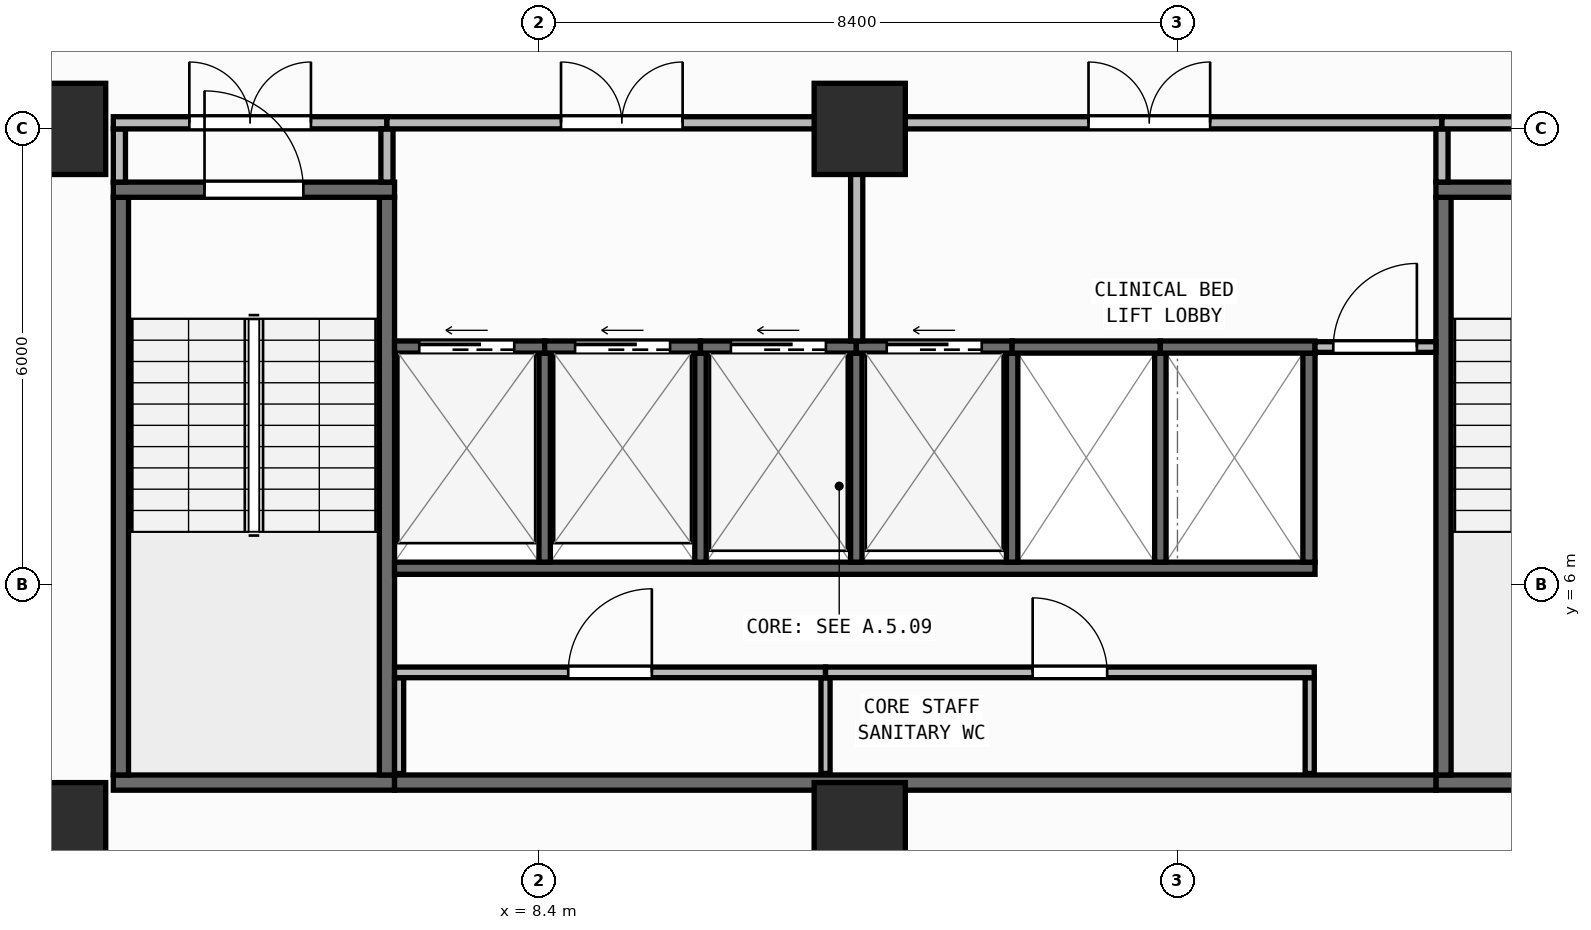
"""IFC4 building model, lengths in metres.
Left out: names, types, materials, properties, quantities, classifications, styles, units other than length and angle.
Written with IfcOpenShell. Run it as: python <this file> out.ifc"""

import sys

from ifc_helpers import new_model, si_unit, direction, frame, frame_2d, origin, origin_2d, place, context, subcontext, project, spatial, rectangle, extrude, element, fill, save


model = new_model("IFC4")
c1 = context("Model", 3, precision=1e-05, world=origin(), true_north=direction((0.0, 1.0)))
c2 = subcontext(c1, "Body", "Model", "MODEL_VIEW")
j1 = project(units=[si_unit("LENGTHUNIT", "METRE"), si_unit("PLANEANGLEUNIT", "RADIAN")], contexts=[c1])
p1 = place(None, origin())
s1 = spatial("IfcSite", under=j1, at=p1, CompositionType="ELEMENT")
p2 = place(p1, origin())
s2 = spatial("IfcBuilding", under=s1, at=p2, CompositionType="ELEMENT")
p3 = place(p2, frame((0.0, 0.0, 123.1)))
s3 = spatial("IfcBuildingStorey", under=s2, at=p3, CompositionType="ELEMENT", Elevation=123.1)
for number, where, z_axis, x_axis in (
    (1, (2.1, 2.8, 0.0), (0.0, 0.0, 1.0), (1.0, 0.0, 0.0)),
    (2, (12.62, 2.8, 0.0), (0.0, 0.0, 1.0), (1.0, 0.0, 0.0)),
    (3, (2.1, 12.0, 0.0), (0.0, 0.0, 1.0), (1.0, 0.0, 0.0)),
    (4, (12.62, 12.0, 0.0), (0.0, 0.0, 1.0), (1.0, 0.0, 0.0)),
):
    element("IfcColumn", number, at=place(p3, frame(where, z_axis=z_axis, x_axis=x_axis)), inside=s3, PredefinedType="COLUMN", context=c2, shape_type="SweptSolid", body=[
        extrude(rectangle(XDim=1.2, YDim=1.2, at=origin_2d()), origin(), (0.0, 0.0, 1.0), 3.95),
    ])
p4 = place(p3, frame((2.76, 0.173, 0.0), z_axis=(0.0, 0.0, 1.0), x_axis=(0.996857931723, 0.079210251617, 0.0)))
e5 = element("IfcWall", 5, at=p4, inside=s3, PredefinedType="STANDARD", context=c2, shape_type="SweptSolid", body=[
    extrude(rectangle(XDim=51.442, YDim=0.26, at=frame_2d((25.721, 0.0))), origin(), (0.0, 0.0, 1.0), 3.71),
])
p5 = place(p4, frame((24.521, 0.0, 0.9)))
e6 = element("IfcOpeningElement", 6, at=p5, cuts=e5, PredefinedType="OPENING", context=c2, shape_type="SweptSolid", body=[
    extrude(rectangle(XDim=2.4, YDim=1.65, at=frame_2d((1.2, 0.825))), frame((0.0, 0.14, 0.0), z_axis=(0.0, -1.0, 0.0), x_axis=(1.0, 0.0, 0.0)), (0.0, 0.0, 1.0), 0.28),
])
p6 = place(p3, frame((2.8, 3.4, 0.0), z_axis=(0.0, 0.0, 1.0), x_axis=(1.0, 0.0, 0.0)))
e7 = element("IfcWall", 7, at=p6, inside=s3, PredefinedType="SHEAR", context=c2, shape_type="SweptSolid", body=[
    extrude(rectangle(XDim=3.7, YDim=0.2, at=frame_2d((1.85, 0.0))), origin(), (0.0, 0.0, 1.0), 3.71),
])
for number, where, z_axis, x_axis in (
    (8, (2.9, 3.5, 0.0), (0.0, 0.0, 1.0), (0.0, 1.0, 0.0)),
    (9, (6.4, 3.5, 0.0), (0.0, 0.0, 1.0), (0.0, 1.0, 0.0)),
):
    element("IfcWall", number, at=place(p3, frame(where, z_axis=z_axis, x_axis=x_axis)), inside=s3, PredefinedType="SHEAR", context=c2, shape_type="SweptSolid", body=[
        extrude(rectangle(XDim=7.6, YDim=0.2, at=frame_2d((3.8, 0.0))), origin(), (0.0, 0.0, 1.0), 3.71),
    ])
p7 = place(p3, frame((2.8, 11.2, 0.0), z_axis=(0.0, 0.0, 1.0), x_axis=(1.0, 0.0, 0.0)))
e10 = element("IfcWall", 10, at=p7, inside=s3, PredefinedType="SHEAR", context=c2, shape_type="SweptSolid", body=[
    extrude(rectangle(XDim=3.7, YDim=0.2, at=frame_2d((1.85, 0.0))), origin(), (0.0, 0.0, 1.0), 3.71),
])
p8 = place(p7, frame((1.2, 0.0, 0.0)))
e11 = element("IfcOpeningElement", 11, at=p8, cuts=e10, PredefinedType="OPENING", context=c2, shape_type="SweptSolid", body=[
    extrude(rectangle(XDim=1.3, YDim=2.15, at=frame_2d((0.65, 1.075))), frame((0.0, 0.11, 0.0), z_axis=(0.0, -1.0, 0.0), x_axis=(1.0, 0.0, 0.0)), (0.0, 0.0, 1.0), 0.22),
])
p9 = place(p3, frame((20.2, 3.4, 0.0), z_axis=(0.0, 0.0, 1.0), x_axis=(1.0, 0.0, 0.0)))
e12 = element("IfcWall", 12, at=p9, inside=s3, PredefinedType="SHEAR", context=c2, shape_type="SweptSolid", body=[
    extrude(rectangle(XDim=3.7, YDim=0.2, at=frame_2d((1.85, 0.0))), origin(), (0.0, 0.0, 1.0), 3.71),
])
p10 = place(p3, frame((20.3, 3.5, 0.0), z_axis=(0.0, 0.0, 1.0), x_axis=(0.0, 1.0, 0.0)))
e13 = element("IfcWall", 13, at=p10, inside=s3, PredefinedType="SHEAR", context=c2, shape_type="SweptSolid", body=[
    extrude(rectangle(XDim=7.6, YDim=0.2, at=frame_2d((3.8, 0.0))), origin(), (0.0, 0.0, 1.0), 3.71),
])
p11 = place(p3, frame((20.2, 11.2, 0.0), z_axis=(0.0, 0.0, 1.0), x_axis=(1.0, 0.0, 0.0)))
e14 = element("IfcWall", 14, at=p11, inside=s3, PredefinedType="SHEAR", context=c2, shape_type="SweptSolid", body=[
    extrude(rectangle(XDim=3.7, YDim=0.2, at=frame_2d((1.85, 0.0))), origin(), (0.0, 0.0, 1.0), 3.71),
])
p12 = place(p11, frame((1.2, 0.0, 0.0)))
e15 = element("IfcOpeningElement", 15, at=p12, cuts=e14, PredefinedType="OPENING", context=c2, shape_type="SweptSolid", body=[
    extrude(rectangle(XDim=1.3, YDim=2.15, at=frame_2d((0.65, 1.075))), frame((0.0, 0.11, 0.0), z_axis=(0.0, -1.0, 0.0), x_axis=(1.0, 0.0, 0.0)), (0.0, 0.0, 1.0), 0.22),
])
p13 = place(p3, frame((6.5, 3.4, 0.0), z_axis=(0.0, 0.0, 1.0), x_axis=(1.0, 0.0, 0.0)))
e16 = element("IfcWall", 16, at=p13, inside=s3, PredefinedType="SHEAR", context=c2, shape_type="SweptSolid", body=[
    extrude(rectangle(XDim=13.7, YDim=0.2, at=frame_2d((6.85, 0.0))), origin(), (0.0, 0.0, 1.0), 3.71),
])
p14 = place(p3, frame((6.5, 6.22, 0.0), z_axis=(0.0, 0.0, 1.0), x_axis=(1.0, 0.0, 0.0)))
e17 = element("IfcWall", 17, at=p14, inside=s3, PredefinedType="SHEAR", context=c2, shape_type="SweptSolid", body=[
    extrude(rectangle(XDim=12.11, YDim=0.16, at=frame_2d((6.055, 0.0))), origin(), (0.0, 0.0, 1.0), 3.71),
])
p15 = place(p3, frame((18.53, 6.3, 0.0), z_axis=(0.0, 0.0, 1.0), x_axis=(0.0, 1.0, 0.0)))
e18 = element("IfcWall", 18, at=p15, inside=s3, PredefinedType="SHEAR", context=c2, shape_type="SweptSolid", body=[
    extrude(rectangle(XDim=2.75, YDim=0.16, at=frame_2d((1.375, 0.0))), origin(), (0.0, 0.0, 1.0), 3.71),
])
for number, where, z_axis, x_axis in (
    (19, (8.475, 6.3, 0.0), (0.0, 0.0, 1.0), (0.0, 1.0, 0.0)),
    (20, (10.525, 6.3, 0.0), (0.0, 0.0, 1.0), (0.0, 1.0, 0.0)),
    (21, (12.575, 6.3, 0.0), (0.0, 0.0, 1.0), (0.0, 1.0, 0.0)),
    (22, (14.625, 6.3, 0.0), (0.0, 0.0, 1.0), (0.0, 1.0, 0.0)),
    (23, (16.575, 6.3, 0.0), (0.0, 0.0, 1.0), (0.0, 1.0, 0.0)),
):
    element("IfcWall", number, at=place(p3, frame(where, z_axis=z_axis, x_axis=x_axis)), inside=s3, PredefinedType="SHEAR", context=c2, shape_type="SweptSolid", body=[
        extrude(rectangle(XDim=2.75, YDim=0.15, at=frame_2d((1.375, 0.0))), origin(), (0.0, 0.0, 1.0), 3.71),
    ])
p16 = place(p3, frame((6.5, 9.13, 0.0), z_axis=(0.0, 0.0, 1.0), x_axis=(1.0, 0.0, 0.0)))
e24 = element("IfcWall", 24, at=p16, inside=s3, PredefinedType="SHEAR", context=c2, shape_type="SweptSolid", body=[
    extrude(rectangle(XDim=1.975, YDim=0.16, at=frame_2d((0.988, 0.0))), origin(), (0.0, 0.0, 1.0), 3.71),
])
p17 = place(p16, frame((0.325, 0.0, 0.0)))
e25 = element("IfcOpeningElement", 25, at=p17, cuts=e24, PredefinedType="OPENING", context=c2, shape_type="SweptSolid", body=[
    extrude(rectangle(XDim=1.25, YDim=2.15, at=frame_2d((0.625, 1.075))), frame((0.0, 0.09, 0.0), z_axis=(0.0, -1.0, 0.0), x_axis=(1.0, 0.0, 0.0)), (0.0, 0.0, 1.0), 0.18),
])
p18 = place(p3, frame((8.475, 9.13, 0.0), z_axis=(0.0, 0.0, 1.0), x_axis=(1.0, 0.0, 0.0)))
e26 = element("IfcWall", 26, at=p18, inside=s3, PredefinedType="SHEAR", context=c2, shape_type="SweptSolid", body=[
    extrude(rectangle(XDim=2.05, YDim=0.16, at=frame_2d((1.025, 0.0))), origin(), (0.0, 0.0, 1.0), 3.71),
])
p19 = place(p18, frame((0.4, 0.0, 0.0)))
e27 = element("IfcOpeningElement", 27, at=p19, cuts=e26, PredefinedType="OPENING", context=c2, shape_type="SweptSolid", body=[
    extrude(rectangle(XDim=1.25, YDim=2.15, at=frame_2d((0.625, 1.075))), frame((0.0, 0.09, 0.0), z_axis=(0.0, -1.0, 0.0), x_axis=(1.0, 0.0, 0.0)), (0.0, 0.0, 1.0), 0.18),
])
p20 = place(p3, frame((10.525, 9.13, 0.0), z_axis=(0.0, 0.0, 1.0), x_axis=(1.0, 0.0, 0.0)))
e28 = element("IfcWall", 28, at=p20, inside=s3, PredefinedType="SHEAR", context=c2, shape_type="SweptSolid", body=[
    extrude(rectangle(XDim=2.05, YDim=0.16, at=frame_2d((1.025, 0.0))), origin(), (0.0, 0.0, 1.0), 3.71),
])
p21 = place(p20, frame((0.4, 0.0, 0.0)))
e29 = element("IfcOpeningElement", 29, at=p21, cuts=e28, PredefinedType="OPENING", context=c2, shape_type="SweptSolid", body=[
    extrude(rectangle(XDim=1.25, YDim=2.15, at=frame_2d((0.625, 1.075))), frame((0.0, 0.09, 0.0), z_axis=(0.0, -1.0, 0.0), x_axis=(1.0, 0.0, 0.0)), (0.0, 0.0, 1.0), 0.18),
])
p22 = place(p3, frame((12.575, 9.13, 0.0), z_axis=(0.0, 0.0, 1.0), x_axis=(1.0, 0.0, 0.0)))
e30 = element("IfcWall", 30, at=p22, inside=s3, PredefinedType="SHEAR", context=c2, shape_type="SweptSolid", body=[
    extrude(rectangle(XDim=2.05, YDim=0.16, at=frame_2d((1.025, 0.0))), origin(), (0.0, 0.0, 1.0), 3.71),
])
p23 = place(p22, frame((0.4, 0.0, 0.0)))
e31 = element("IfcOpeningElement", 31, at=p23, cuts=e30, PredefinedType="OPENING", context=c2, shape_type="SweptSolid", body=[
    extrude(rectangle(XDim=1.25, YDim=2.15, at=frame_2d((0.625, 1.075))), frame((0.0, 0.09, 0.0), z_axis=(0.0, -1.0, 0.0), x_axis=(1.0, 0.0, 0.0)), (0.0, 0.0, 1.0), 0.18),
])
p24 = place(p3, frame((14.625, 9.13, 0.0), z_axis=(0.0, 0.0, 1.0), x_axis=(1.0, 0.0, 0.0)))
e32 = element("IfcWall", 32, at=p24, inside=s3, PredefinedType="SHEAR", context=c2, shape_type="SweptSolid", body=[
    extrude(rectangle(XDim=1.95, YDim=0.16, at=frame_2d((0.975, 0.0))), origin(), (0.0, 0.0, 1.0), 3.71),
])
p25 = place(p3, frame((16.575, 9.13, 0.0), z_axis=(0.0, 0.0, 1.0), x_axis=(1.0, 0.0, 0.0)))
e33 = element("IfcWall", 33, at=p25, inside=s3, PredefinedType="SHEAR", context=c2, shape_type="SweptSolid", body=[
    extrude(rectangle(XDim=2.035, YDim=0.16, at=frame_2d((1.018, 0.0))), origin(), (0.0, 0.0, 1.0), 3.71),
])
for number, where, z_axis, x_axis in (
    (34, (6.56, 3.52, 0.0), (0.0, 0.0, 1.0), (0.0, 1.0, 0.0)),
    (35, (12.17, 3.52, 0.0), (0.0, 0.0, 1.0), (0.0, 1.0, 0.0)),
    (36, (18.54, 3.52, 0.0), (0.0, 0.0, 1.0), (0.0, 1.0, 0.0)),
):
    element("IfcWall", number, at=place(p3, frame(where, z_axis=z_axis, x_axis=x_axis)), inside=s3, PredefinedType="PARTITIONING", context=c2, shape_type="SweptSolid", body=[
        extrude(rectangle(XDim=1.26, YDim=0.12, at=frame_2d((0.63, 0.0))), origin(), (0.0, 0.0, 1.0), 3.71),
    ])
p26 = place(p3, frame((6.5, 4.85, 0.0), z_axis=(0.0, 0.0, 1.0), x_axis=(1.0, 0.0, 0.0)))
e37 = element("IfcWall", 37, at=p26, inside=s3, PredefinedType="PARTITIONING", context=c2, shape_type="SweptSolid", body=[
    extrude(rectangle(XDim=5.67, YDim=0.14, at=frame_2d((2.835, 0.0))), origin(), (0.0, 0.0, 1.0), 3.71),
])
p27 = place(p26, frame((2.285, 0.0, 0.0)))
e38 = element("IfcOpeningElement", 38, at=p27, cuts=e37, PredefinedType="OPENING", context=c2, shape_type="SweptSolid", body=[
    extrude(rectangle(XDim=1.1, YDim=2.1, at=frame_2d((0.55, 1.05))), frame((0.0, 0.08, 0.0), z_axis=(0.0, -1.0, 0.0), x_axis=(1.0, 0.0, 0.0)), (0.0, 0.0, 1.0), 0.16),
])
p28 = place(p3, frame((12.17, 4.85, 0.0), z_axis=(0.0, 0.0, 1.0), x_axis=(1.0, 0.0, 0.0)))
e39 = element("IfcWall", 39, at=p28, inside=s3, PredefinedType="PARTITIONING", context=c2, shape_type="SweptSolid", body=[
    extrude(rectangle(XDim=6.43, YDim=0.14, at=frame_2d((3.215, 0.0))), origin(), (0.0, 0.0, 1.0), 3.71),
])
p29 = place(p28, frame((2.725, 0.0, 0.0)))
e40 = element("IfcOpeningElement", 40, at=p29, cuts=e39, PredefinedType="OPENING", context=c2, shape_type="SweptSolid", body=[
    extrude(rectangle(XDim=0.98, YDim=2.1, at=frame_2d((0.49, 1.05))), frame((0.0, 0.08, 0.0), z_axis=(0.0, -1.0, 0.0), x_axis=(1.0, 0.0, 0.0)), (0.0, 0.0, 1.0), 0.16),
])
p30 = place(p3, frame((18.61, 9.13, 0.0), z_axis=(0.0, 0.0, 1.0), x_axis=(1.0, 0.0, 0.0)))
e41 = element("IfcWall", 41, at=p30, inside=s3, PredefinedType="PARTITIONING", context=c2, shape_type="SweptSolid", body=[
    extrude(rectangle(XDim=1.59, YDim=0.14, at=frame_2d((0.795, 0.0))), origin(), (0.0, 0.0, 1.0), 3.71),
])
p31 = place(p30, frame((0.24, 0.0, 0.0)))
e42 = element("IfcOpeningElement", 42, at=p31, cuts=e41, PredefinedType="OPENING", context=c2, shape_type="SweptSolid", body=[
    extrude(rectangle(XDim=1.1, YDim=2.1, at=frame_2d((0.55, 1.05))), frame((0.0, 0.08, 0.0), z_axis=(0.0, -1.0, 0.0), x_axis=(1.0, 0.0, 0.0)), (0.0, 0.0, 1.0), 0.16),
])
p32 = place(p3, frame((2.88, 11.3, 0.0), z_axis=(0.0, 0.0, 1.0), x_axis=(0.0, 1.0, 0.0)))
e43 = element("IfcWall", 43, at=p32, inside=s3, PredefinedType="PARTITIONING", context=c2, shape_type="SweptSolid", body=[
    extrude(rectangle(XDim=0.7, YDim=0.16, at=frame_2d((0.35, 0.0))), origin(), (0.0, 0.0, 1.0), 3.71),
])
p33 = place(p3, frame((2.8, 12.08, 0.0), z_axis=(0.0, 0.0, 1.0), x_axis=(1.0, 0.0, 0.0)))
e44 = element("IfcWall", 44, at=p33, inside=s3, PredefinedType="PARTITIONING", context=c2, shape_type="SweptSolid", body=[
    extrude(rectangle(XDim=3.6, YDim=0.16, at=frame_2d((1.8, 0.0))), origin(), (0.0, 0.0, 1.0), 3.083),
])
p34 = place(p33, frame((1.0, 0.0, 0.0)))
e45 = element("IfcOpeningElement", 45, at=p34, cuts=e44, PredefinedType="OPENING", context=c2, shape_type="SweptSolid", body=[
    extrude(rectangle(XDim=1.6, YDim=2.05, at=frame_2d((0.8, 1.025))), frame((0.0, 0.09, 0.0), z_axis=(0.0, -1.0, 0.0), x_axis=(1.0, 0.0, 0.0)), (0.0, 0.0, 1.0), 0.18),
])
p35 = place(p3, frame((6.4, 11.3, 0.0), z_axis=(0.0, 0.0, 1.0), x_axis=(0.0, 1.0, 0.0)))
e46 = element("IfcWall", 46, at=p35, inside=s3, PredefinedType="PARTITIONING", context=c2, shape_type="SweptSolid", body=[
    extrude(rectangle(XDim=0.7, YDim=0.16, at=frame_2d((0.35, 0.0))), origin(), (0.0, 0.0, 1.0), 3.71),
])
p36 = place(p3, frame((6.4, 12.08, 0.0), z_axis=(0.0, 0.0, 1.0), x_axis=(1.0, 0.0, 0.0)))
e47 = element("IfcWall", 47, at=p36, inside=s3, PredefinedType="PARTITIONING", context=c2, shape_type="SweptSolid", body=[
    extrude(rectangle(XDim=6.18, YDim=0.16, at=frame_2d((3.09, 0.0))), origin(), (0.0, 0.0, 1.0), 3.083),
])
p37 = place(p36, frame((2.29, 0.0, 0.0)))
e48 = element("IfcOpeningElement", 48, at=p37, cuts=e47, PredefinedType="OPENING", context=c2, shape_type="SweptSolid", body=[
    extrude(rectangle(XDim=1.6, YDim=2.05, at=frame_2d((0.8, 1.025))), frame((0.0, 0.09, 0.0), z_axis=(0.0, -1.0, 0.0), x_axis=(1.0, 0.0, 0.0)), (0.0, 0.0, 1.0), 0.18),
])
p38 = place(p3, frame((12.58, 9.21, 0.0), z_axis=(0.0, 0.0, 1.0), x_axis=(0.0, 1.0, 0.0)))
e49 = element("IfcWall", 49, at=p38, inside=s3, PredefinedType="PARTITIONING", context=c2, shape_type="SweptSolid", body=[
    extrude(rectangle(XDim=2.79, YDim=0.16, at=frame_2d((1.395, 0.0))), origin(), (0.0, 0.0, 1.0), 3.71),
])
p39 = place(p3, frame((12.58, 12.08, 0.0), z_axis=(0.0, 0.0, 1.0), x_axis=(1.0, 0.0, 0.0)))
e50 = element("IfcWall", 50, at=p39, inside=s3, PredefinedType="PARTITIONING", context=c2, shape_type="SweptSolid", body=[
    extrude(rectangle(XDim=7.7, YDim=0.16, at=frame_2d((3.85, 0.0))), origin(), (0.0, 0.0, 1.0), 3.083),
])
p40 = place(p39, frame((3.05, 0.0, 0.0)))
e51 = element("IfcOpeningElement", 51, at=p40, cuts=e50, PredefinedType="OPENING", context=c2, shape_type="SweptSolid", body=[
    extrude(rectangle(XDim=1.6, YDim=2.05, at=frame_2d((0.8, 1.025))), frame((0.0, 0.09, 0.0), z_axis=(0.0, -1.0, 0.0), x_axis=(1.0, 0.0, 0.0)), (0.0, 0.0, 1.0), 0.18),
])
p41 = place(p3, frame((20.28, 11.3, 0.0), z_axis=(0.0, 0.0, 1.0), x_axis=(0.0, 1.0, 0.0)))
e52 = element("IfcWall", 52, at=p41, inside=s3, PredefinedType="PARTITIONING", context=c2, shape_type="SweptSolid", body=[
    extrude(rectangle(XDim=0.7, YDim=0.16, at=frame_2d((0.35, 0.0))), origin(), (0.0, 0.0, 1.0), 3.71),
])
p42 = place(p3, frame((20.28, 12.08, 0.0), z_axis=(0.0, 0.0, 1.0), x_axis=(1.0, 0.0, 0.0)))
e53 = element("IfcWall", 53, at=p42, inside=s3, PredefinedType="PARTITIONING", context=c2, shape_type="SweptSolid", body=[
    extrude(rectangle(XDim=3.62, YDim=0.16, at=frame_2d((1.81, 0.0))), origin(), (0.0, 0.0, 1.0), 3.083),
])
p43 = place(p42, frame((1.01, 0.0, 0.0)))
e54 = element("IfcOpeningElement", 54, at=p43, cuts=e53, PredefinedType="OPENING", context=c2, shape_type="SweptSolid", body=[
    extrude(rectangle(XDim=1.6, YDim=2.05, at=frame_2d((0.8, 1.025))), frame((0.0, 0.09, 0.0), z_axis=(0.0, -1.0, 0.0), x_axis=(1.0, 0.0, 0.0)), (0.0, 0.0, 1.0), 0.18),
])
p44 = place(p8, origin())
e55 = element("IfcDoor", 55, at=p44, inside=s3, OperationType="SINGLE_SWING_LEFT", PredefinedType="DOOR", context=c2, shape_type="SweptSolid", body=[
    extrude(rectangle(XDim=1.3, YDim=2.15, at=frame_2d((0.65, 1.075))), frame((0.0, 0.025, 0.0), z_axis=(0.0, -1.0, 0.0), x_axis=(1.0, 0.0, 0.0)), (0.0, 0.0, 1.0), 0.05),
])
fill(e11, e55)
p45 = place(p17, origin())
e56 = element("IfcDoor", 56, at=p45, inside=s3, OperationType="SLIDING_TO_LEFT", PredefinedType="DOOR", context=c2, shape_type="SweptSolid", body=[
    extrude(rectangle(XDim=1.25, YDim=2.15, at=frame_2d((0.625, 1.075))), frame((0.0, 0.025, 0.0), z_axis=(0.0, -1.0, 0.0), x_axis=(1.0, 0.0, 0.0)), (0.0, 0.0, 1.0), 0.05),
])
fill(e25, e56)
p46 = place(p19, origin())
e57 = element("IfcDoor", 57, at=p46, inside=s3, OperationType="SLIDING_TO_LEFT", PredefinedType="DOOR", context=c2, shape_type="SweptSolid", body=[
    extrude(rectangle(XDim=1.25, YDim=2.15, at=frame_2d((0.625, 1.075))), frame((0.0, 0.025, 0.0), z_axis=(0.0, -1.0, 0.0), x_axis=(1.0, 0.0, 0.0)), (0.0, 0.0, 1.0), 0.05),
])
fill(e27, e57)
p47 = place(p21, origin())
e58 = element("IfcDoor", 58, at=p47, inside=s3, OperationType="SLIDING_TO_LEFT", PredefinedType="DOOR", context=c2, shape_type="SweptSolid", body=[
    extrude(rectangle(XDim=1.25, YDim=2.15, at=frame_2d((0.625, 1.075))), frame((0.0, 0.025, 0.0), z_axis=(0.0, -1.0, 0.0), x_axis=(1.0, 0.0, 0.0)), (0.0, 0.0, 1.0), 0.05),
])
fill(e29, e58)
p48 = place(p23, origin())
e59 = element("IfcDoor", 59, at=p48, inside=s3, OperationType="SLIDING_TO_LEFT", PredefinedType="DOOR", context=c2, shape_type="SweptSolid", body=[
    extrude(rectangle(XDim=1.25, YDim=2.15, at=frame_2d((0.625, 1.075))), frame((0.0, 0.025, 0.0), z_axis=(0.0, -1.0, 0.0), x_axis=(1.0, 0.0, 0.0)), (0.0, 0.0, 1.0), 0.05),
])
fill(e31, e59)
p49 = place(p27, origin())
e60 = element("IfcDoor", 60, at=p49, inside=s3, OperationType="SINGLE_SWING_RIGHT", PredefinedType="DOOR", context=c2, shape_type="SweptSolid", body=[
    extrude(rectangle(XDim=1.1, YDim=2.1, at=frame_2d((0.55, 1.05))), frame((0.0, 0.025, 0.0), z_axis=(0.0, -1.0, 0.0), x_axis=(1.0, 0.0, 0.0)), (0.0, 0.0, 1.0), 0.05),
])
fill(e38, e60)
p50 = place(p29, origin())
e61 = element("IfcDoor", 61, at=p50, inside=s3, OperationType="SINGLE_SWING_LEFT", PredefinedType="DOOR", context=c2, shape_type="SweptSolid", body=[
    extrude(rectangle(XDim=0.98, YDim=2.1, at=frame_2d((0.49, 1.05))), frame((0.0, 0.025, 0.0), z_axis=(0.0, -1.0, 0.0), x_axis=(1.0, 0.0, 0.0)), (0.0, 0.0, 1.0), 0.05),
])
fill(e40, e61)
p51 = place(p31, origin())
e62 = element("IfcDoor", 62, at=p51, inside=s3, OperationType="SINGLE_SWING_RIGHT", PredefinedType="DOOR", context=c2, shape_type="SweptSolid", body=[
    extrude(rectangle(XDim=1.1, YDim=2.1, at=frame_2d((0.55, 1.05))), frame((0.0, 0.025, 0.0), z_axis=(0.0, -1.0, 0.0), x_axis=(1.0, 0.0, 0.0)), (0.0, 0.0, 1.0), 0.05),
])
fill(e42, e62)
p52 = place(p34, origin())
e63 = element("IfcDoor", 63, at=p52, inside=s3, OperationType="DOUBLE_DOOR_SINGLE_SWING", PredefinedType="DOOR", context=c2, shape_type="SweptSolid", body=[
    extrude(rectangle(XDim=1.6, YDim=2.05, at=frame_2d((0.8, 1.025))), frame((0.0, 0.025, 0.0), z_axis=(0.0, -1.0, 0.0), x_axis=(1.0, 0.0, 0.0)), (0.0, 0.0, 1.0), 0.05),
])
fill(e45, e63)
p53 = place(p37, origin())
e64 = element("IfcDoor", 64, at=p53, inside=s3, OperationType="DOUBLE_DOOR_SINGLE_SWING", PredefinedType="DOOR", context=c2, shape_type="SweptSolid", body=[
    extrude(rectangle(XDim=1.6, YDim=2.05, at=frame_2d((0.8, 1.025))), frame((0.0, 0.025, 0.0), z_axis=(0.0, -1.0, 0.0), x_axis=(1.0, 0.0, 0.0)), (0.0, 0.0, 1.0), 0.05),
])
fill(e48, e64)
p54 = place(p40, origin())
e65 = element("IfcDoor", 65, at=p54, inside=s3, OperationType="DOUBLE_DOOR_SINGLE_SWING", PredefinedType="DOOR", context=c2, shape_type="SweptSolid", body=[
    extrude(rectangle(XDim=1.6, YDim=2.05, at=frame_2d((0.8, 1.025))), frame((0.0, 0.025, 0.0), z_axis=(0.0, -1.0, 0.0), x_axis=(1.0, 0.0, 0.0)), (0.0, 0.0, 1.0), 0.05),
])
fill(e51, e65)
save(model, sys.argv[1])
